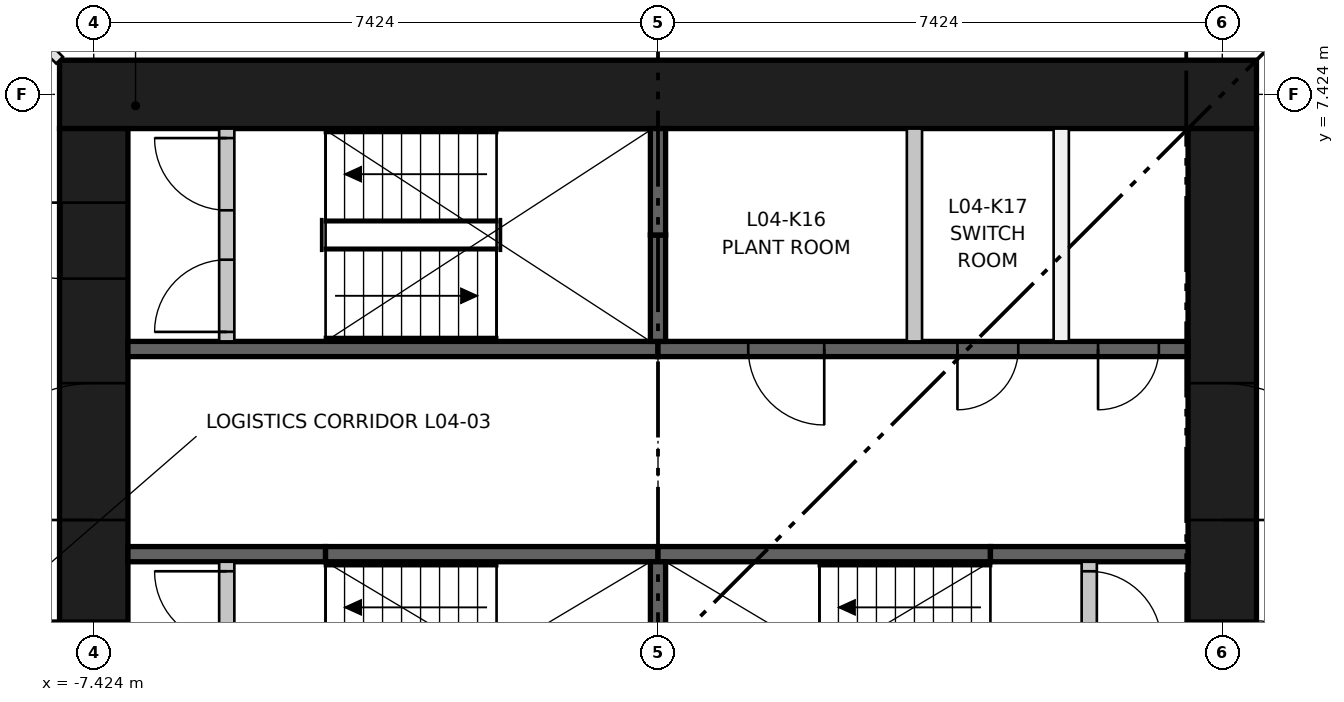
"""IFC4 building model, lengths in metres.
Left out: names, types, materials, properties, quantities, classifications, styles, units other than length and angle.
Written with IfcOpenShell. Run it as: python <this file> out.ifc"""

import sys

from ifc_helpers import new_model, si_unit, direction, frame, frame_2d, origin, place, context, subcontext, project, spatial, rectangle, extrude, element, fill, save


model = new_model("IFC4")
c1 = context("Model", 3, precision=1e-05, world=origin(), true_north=direction((0.0, 1.0)))
c2 = subcontext(c1, "Body", "Model", "MODEL_VIEW")
j1 = project(units=[si_unit("LENGTHUNIT", "METRE"), si_unit("PLANEANGLEUNIT", "RADIAN")], contexts=[c1])
p1 = place(None, origin())
s1 = spatial("IfcSite", under=j1, at=p1, CompositionType="ELEMENT")
p2 = place(p1, origin())
s2 = spatial("IfcBuilding", under=s1, at=p2, CompositionType="ELEMENT")
p3 = place(p2, frame((0.0, 0.0, 18.5)))
s3 = spatial("IfcBuildingStorey", under=s2, at=p3, CompositionType="ELEMENT", Elevation=18.5)
p4 = place(p3, frame((-7.874, 7.424, 0.0), z_axis=(0.0, 0.0, 1.0), x_axis=(1.0, 0.0, 0.0)))
e1 = element("IfcWall", 1, at=p4, inside=s3, PredefinedType="SHEAR", context=c2, shape_type="SweptSolid", body=[
    extrude(rectangle(XDim=15.748, YDim=0.9, at=frame_2d((7.874, 0.0))), origin(), (0.0, 0.0, 1.0), 3.9),
])
p5 = place(p3, frame((-7.424, -6.974, 0.0), z_axis=(0.0, 0.0, 1.0), x_axis=(0.0, 1.0, 0.0)))
e2 = element("IfcWall", 2, at=p5, inside=s3, PredefinedType="SHEAR", context=c2, shape_type="SweptSolid", body=[
    extrude(rectangle(XDim=13.948, YDim=0.9, at=frame_2d((6.974, 0.0))), origin(), (0.0, 0.0, 1.0), 3.9),
])
p6 = place(p5, frame((6.474, 0.0, 0.0)))
e3 = element("IfcOpeningElement", 3, at=p6, cuts=e2, PredefinedType="OPENING", context=c2, shape_type="SweptSolid", body=[
    extrude(rectangle(XDim=1.0, YDim=2.1, at=frame_2d((0.5, 1.05))), frame((0.0, 0.46, 0.0), z_axis=(0.0, -1.0, 0.0), x_axis=(1.0, 0.0, 0.0)), (0.0, 0.0, 1.0), 0.92),
])
p7 = place(p5, frame((3.35, 0.0, 0.0)))
e4 = element("IfcOpeningElement", 4, at=p7, cuts=e2, PredefinedType="OPENING", context=c2, shape_type="SweptSolid", body=[
    extrude(rectangle(XDim=1.8, YDim=2.1, at=frame_2d((0.9, 1.05))), frame((0.0, 0.46, 0.0), z_axis=(0.0, -1.0, 0.0), x_axis=(1.0, 0.0, 0.0)), (0.0, 0.0, 1.0), 0.92),
])
p8 = place(p5, frame((8.799, 0.0, 0.0)))
e5 = element("IfcOpeningElement", 5, at=p8, cuts=e2, PredefinedType="OPENING", context=c2, shape_type="SweptSolid", body=[
    extrude(rectangle(XDim=1.8, YDim=2.1, at=frame_2d((0.9, 1.05))), frame((0.0, 0.46, 0.0), z_axis=(0.0, -1.0, 0.0), x_axis=(1.0, 0.0, 0.0)), (0.0, 0.0, 1.0), 0.92),
])
p9 = place(p5, frame((11.974, 0.0, 0.0)))
e6 = element("IfcOpeningElement", 6, at=p9, cuts=e2, PredefinedType="OPENING", context=c2, shape_type="SweptSolid", body=[
    extrude(rectangle(XDim=1.0, YDim=2.1, at=frame_2d((0.5, 1.05))), frame((0.0, 0.46, 0.0), z_axis=(0.0, -1.0, 0.0), x_axis=(1.0, 0.0, 0.0)), (0.0, 0.0, 1.0), 0.92),
])
p10 = place(p3, frame((7.424, -6.974, 0.0), z_axis=(0.0, 0.0, 1.0), x_axis=(0.0, 1.0, 0.0)))
e7 = element("IfcWall", 7, at=p10, inside=s3, PredefinedType="SHEAR", context=c2, shape_type="SweptSolid", body=[
    extrude(rectangle(XDim=13.948, YDim=0.9, at=frame_2d((6.974, 0.0))), origin(), (0.0, 0.0, 1.0), 3.9),
])
p11 = place(p10, frame((6.474, 0.0, 0.0)))
e8 = element("IfcOpeningElement", 8, at=p11, cuts=e7, PredefinedType="OPENING", context=c2, shape_type="SweptSolid", body=[
    extrude(rectangle(XDim=1.0, YDim=2.1, at=frame_2d((0.5, 1.05))), frame((0.0, 0.46, 0.0), z_axis=(0.0, -1.0, 0.0), x_axis=(1.0, 0.0, 0.0)), (0.0, 0.0, 1.0), 0.92),
])
p12 = place(p10, frame((3.35, 0.0, 0.0)))
e9 = element("IfcOpeningElement", 9, at=p12, cuts=e7, PredefinedType="OPENING", context=c2, shape_type="SweptSolid", body=[
    extrude(rectangle(XDim=1.8, YDim=2.1, at=frame_2d((0.9, 1.05))), frame((0.0, 0.46, 0.0), z_axis=(0.0, -1.0, 0.0), x_axis=(1.0, 0.0, 0.0)), (0.0, 0.0, 1.0), 0.92),
])
p13 = place(p10, frame((8.799, 0.0, 0.0)))
e10 = element("IfcOpeningElement", 10, at=p13, cuts=e7, PredefinedType="OPENING", context=c2, shape_type="SweptSolid", body=[
    extrude(rectangle(XDim=1.8, YDim=2.1, at=frame_2d((0.9, 1.05))), frame((0.0, 0.46, 0.0), z_axis=(0.0, -1.0, 0.0), x_axis=(1.0, 0.0, 0.0)), (0.0, 0.0, 1.0), 0.92),
])
p14 = place(p3, frame((-6.974, 4.074, 0.0), z_axis=(0.0, 0.0, 1.0), x_axis=(1.0, 0.0, 0.0)))
e11 = element("IfcWall", 11, at=p14, inside=s3, PredefinedType="SHEAR", context=c2, shape_type="SweptSolid", body=[
    extrude(rectangle(XDim=6.974, YDim=0.2, at=frame_2d((3.487, 0.0))), origin(), (0.0, 0.0, 1.0), 3.55),
])
p15 = place(p3, frame((0.0, 4.074, 0.0), z_axis=(0.0, 0.0, 1.0), x_axis=(1.0, 0.0, 0.0)))
e12 = element("IfcWall", 12, at=p15, inside=s3, PredefinedType="SHEAR", context=c2, shape_type="SweptSolid", body=[
    extrude(rectangle(XDim=6.974, YDim=0.2, at=frame_2d((3.487, 0.0))), origin(), (0.0, 0.0, 1.0), 3.55),
])
p16 = place(p15, frame((1.187, 0.0, 0.0)))
e13 = element("IfcOpeningElement", 13, at=p16, cuts=e12, PredefinedType="OPENING", context=c2, shape_type="SweptSolid", body=[
    extrude(rectangle(XDim=1.0, YDim=2.1, at=frame_2d((0.5, 1.05))), frame((0.0, 0.11, 0.0), z_axis=(0.0, -1.0, 0.0), x_axis=(1.0, 0.0, 0.0)), (0.0, 0.0, 1.0), 0.22),
])
p17 = place(p15, frame((3.94, 0.0, 0.0)))
e14 = element("IfcOpeningElement", 14, at=p17, cuts=e12, PredefinedType="OPENING", context=c2, shape_type="SweptSolid", body=[
    extrude(rectangle(XDim=0.8, YDim=2.1, at=frame_2d((0.4, 1.05))), frame((0.0, 0.11, 0.0), z_axis=(0.0, -1.0, 0.0), x_axis=(1.0, 0.0, 0.0)), (0.0, 0.0, 1.0), 0.22),
])
p18 = place(p15, frame((5.79, 0.0, 0.0)))
e15 = element("IfcOpeningElement", 15, at=p18, cuts=e12, PredefinedType="OPENING", context=c2, shape_type="SweptSolid", body=[
    extrude(rectangle(XDim=0.8, YDim=2.1, at=frame_2d((0.4, 1.05))), frame((0.0, 0.11, 0.0), z_axis=(0.0, -1.0, 0.0), x_axis=(1.0, 0.0, 0.0)), (0.0, 0.0, 1.0), 0.22),
])
p19 = place(p3, frame((-6.974, 1.375, 0.0), z_axis=(0.0, 0.0, 1.0), x_axis=(1.0, 0.0, 0.0)))
e16 = element("IfcWall", 16, at=p19, inside=s3, PredefinedType="SHEAR", context=c2, shape_type="SweptSolid", body=[
    extrude(rectangle(XDim=2.6, YDim=0.2, at=frame_2d((1.3, 0.0))), origin(), (0.0, 0.0, 1.0), 3.55),
])
for number, where, z_axis, x_axis in (
    (17, (-4.374, 1.375, 0.0), (0.0, 0.0, 1.0), (1.0, 0.0, 0.0)),
    (18, (0.0, 1.375, 0.0), (0.0, 0.0, 1.0), (1.0, 0.0, 0.0)),
):
    element("IfcWall", number, at=place(p3, frame(where, z_axis=z_axis, x_axis=x_axis)), inside=s3, PredefinedType="SHEAR", context=c2, shape_type="SweptSolid", body=[
        extrude(rectangle(XDim=4.374, YDim=0.2, at=frame_2d((2.187, 0.0))), origin(), (0.0, 0.0, 1.0), 3.55),
    ])
p20 = place(p3, frame((4.374, 1.375, 0.0), z_axis=(0.0, 0.0, 1.0), x_axis=(1.0, 0.0, 0.0)))
e19 = element("IfcWall", 19, at=p20, inside=s3, PredefinedType="SHEAR", context=c2, shape_type="SweptSolid", body=[
    extrude(rectangle(XDim=2.6, YDim=0.2, at=frame_2d((1.3, 0.0))), origin(), (0.0, 0.0, 1.0), 3.55),
])
p21 = place(p3, frame((0.0, -1.275, 0.0), z_axis=(0.0, 0.0, 1.0), x_axis=(0.0, 1.0, 0.0)))
e20 = element("IfcWall", 20, at=p21, inside=s3, PredefinedType="SHEAR", context=c2, shape_type="SweptSolid", body=[
    extrude(rectangle(XDim=2.55, YDim=0.2, at=frame_2d((1.275, 0.0))), origin(), (0.0, 0.0, 1.0), 3.55),
])
p22 = place(p3, frame((0.0, 4.174, 0.0), z_axis=(0.0, 0.0, 1.0), x_axis=(0.0, 1.0, 0.0)))
e21 = element("IfcWall", 21, at=p22, inside=s3, PredefinedType="SHEAR", context=c2, shape_type="SweptSolid", body=[
    extrude(rectangle(XDim=1.4, YDim=0.2, at=frame_2d((0.7, 0.0))), origin(), (0.0, 0.0, 1.0), 3.55),
])
p23 = place(p3, frame((0.0, 5.574, 0.0), z_axis=(0.0, 0.0, 1.0), x_axis=(0.0, 1.0, 0.0)))
e22 = element("IfcWall", 22, at=p23, inside=s3, PredefinedType="SHEAR", context=c2, shape_type="SweptSolid", body=[
    extrude(rectangle(XDim=1.4, YDim=0.2, at=frame_2d((0.7, 0.0))), origin(), (0.0, 0.0, 1.0), 3.55),
])
for number, where, z_axis, x_axis in (
    (23, (3.374, 4.174, 0.0), (0.0, 0.0, 1.0), (0.0, 1.0, 0.0)),
    (24, (5.305, 4.174, 0.0), (0.0, 0.0, 1.0), (0.0, 1.0, 0.0)),
):
    element("IfcWall", number, at=place(p3, frame(where, z_axis=z_axis, x_axis=x_axis)), inside=s3, PredefinedType="PARTITIONING", context=c2, shape_type="SweptSolid", body=[
        extrude(rectangle(XDim=2.8, YDim=0.2, at=frame_2d((1.4, 0.0))), origin(), (0.0, 0.0, 1.0), 3.55),
    ])
p24 = place(p3, frame((-5.674, -1.275, 0.0), z_axis=(0.0, 0.0, 1.0), x_axis=(0.0, 1.0, 0.0)))
e25 = element("IfcWall", 25, at=p24, inside=s3, PredefinedType="PARTITIONING", context=c2, shape_type="SweptSolid", body=[
    extrude(rectangle(XDim=2.55, YDim=0.2, at=frame_2d((1.275, 0.0))), origin(), (0.0, 0.0, 1.0), 3.55),
])
p25 = place(p24, frame((0.125, 0.0, 0.0)))
e26 = element("IfcOpeningElement", 26, at=p25, cuts=e25, PredefinedType="OPENING", context=c2, shape_type="SweptSolid", body=[
    extrude(rectangle(XDim=0.95, YDim=2.1, at=frame_2d((0.475, 1.05))), frame((0.0, 0.11, 0.0), z_axis=(0.0, -1.0, 0.0), x_axis=(1.0, 0.0, 0.0)), (0.0, 0.0, 1.0), 0.22),
])
p26 = place(p24, frame((1.475, 0.0, 0.0)))
e27 = element("IfcOpeningElement", 27, at=p26, cuts=e25, PredefinedType="OPENING", context=c2, shape_type="SweptSolid", body=[
    extrude(rectangle(XDim=0.95, YDim=2.1, at=frame_2d((0.475, 1.05))), frame((0.0, 0.11, 0.0), z_axis=(0.0, -1.0, 0.0), x_axis=(1.0, 0.0, 0.0)), (0.0, 0.0, 1.0), 0.22),
])
p27 = place(p3, frame((5.674, -1.275, 0.0), z_axis=(0.0, 0.0, 1.0), x_axis=(0.0, 1.0, 0.0)))
e28 = element("IfcWall", 28, at=p27, inside=s3, PredefinedType="PARTITIONING", context=c2, shape_type="SweptSolid", body=[
    extrude(rectangle(XDim=2.55, YDim=0.2, at=frame_2d((1.275, 0.0))), origin(), (0.0, 0.0, 1.0), 3.55),
])
p28 = place(p27, frame((0.125, 0.0, 0.0)))
e29 = element("IfcOpeningElement", 29, at=p28, cuts=e28, PredefinedType="OPENING", context=c2, shape_type="SweptSolid", body=[
    extrude(rectangle(XDim=0.95, YDim=2.1, at=frame_2d((0.475, 1.05))), frame((0.0, 0.11, 0.0), z_axis=(0.0, -1.0, 0.0), x_axis=(1.0, 0.0, 0.0)), (0.0, 0.0, 1.0), 0.22),
])
p29 = place(p27, frame((1.475, 0.0, 0.0)))
e30 = element("IfcOpeningElement", 30, at=p29, cuts=e28, PredefinedType="OPENING", context=c2, shape_type="SweptSolid", body=[
    extrude(rectangle(XDim=0.95, YDim=2.1, at=frame_2d((0.475, 1.05))), frame((0.0, 0.11, 0.0), z_axis=(0.0, -1.0, 0.0), x_axis=(1.0, 0.0, 0.0)), (0.0, 0.0, 1.0), 0.22),
])
p30 = place(p3, frame((-5.674, 4.174, 0.0), z_axis=(0.0, 0.0, 1.0), x_axis=(0.0, 1.0, 0.0)))
e31 = element("IfcWall", 31, at=p30, inside=s3, PredefinedType="PARTITIONING", context=c2, shape_type="SweptSolid", body=[
    extrude(rectangle(XDim=2.8, YDim=0.2, at=frame_2d((1.4, 0.0))), origin(), (0.0, 0.0, 1.0), 3.55),
])
p31 = place(p30, frame((0.125, 0.0, 0.0)))
e32 = element("IfcOpeningElement", 32, at=p31, cuts=e31, PredefinedType="OPENING", context=c2, shape_type="SweptSolid", body=[
    extrude(rectangle(XDim=0.95, YDim=2.1, at=frame_2d((0.475, 1.05))), frame((0.0, 0.11, 0.0), z_axis=(0.0, -1.0, 0.0), x_axis=(1.0, 0.0, 0.0)), (0.0, 0.0, 1.0), 0.22),
])
p32 = place(p30, frame((1.725, 0.0, 0.0)))
e33 = element("IfcOpeningElement", 33, at=p32, cuts=e31, PredefinedType="OPENING", context=c2, shape_type="SweptSolid", body=[
    extrude(rectangle(XDim=0.95, YDim=2.1, at=frame_2d((0.475, 1.05))), frame((0.0, 0.11, 0.0), z_axis=(0.0, -1.0, 0.0), x_axis=(1.0, 0.0, 0.0)), (0.0, 0.0, 1.0), 0.22),
])
p33 = place(p3, frame((-7.874, 7.874, 0.0), z_axis=(0.0, 0.0, 1.0), x_axis=(-0.707106781187, 0.707106781187, 0.0)))
e34 = element("IfcWall", 34, at=p33, inside=s3, PredefinedType="PARTITIONING", context=c2, shape_type="SweptSolid", body=[
    extrude(rectangle(XDim=2.102, YDim=0.125, at=frame_2d((1.051, 0.0))), origin(), (0.0, 0.0, 1.0), 3.55),
])
p34 = place(p33, frame((0.6, 0.0, 0.0)))
e35 = element("IfcOpeningElement", 35, at=p34, cuts=e34, PredefinedType="OPENING", context=c2, shape_type="SweptSolid", body=[
    extrude(rectangle(XDim=1.0, YDim=2.1, at=frame_2d((0.5, 1.05))), frame((0.0, 0.073, 0.0), z_axis=(0.0, -1.0, 0.0), x_axis=(1.0, 0.0, 0.0)), (0.0, 0.0, 1.0), 0.145),
])
p35 = place(p26, origin())
e36 = element("IfcDoor", 36, at=p35, inside=s3, OperationType="SINGLE_SWING_RIGHT", PredefinedType="DOOR", context=c2, shape_type="SweptSolid", body=[
    extrude(rectangle(XDim=0.95, YDim=2.1, at=frame_2d((0.475, 1.05))), frame((0.0, 0.025, 0.0), z_axis=(0.0, -1.0, 0.0), x_axis=(1.0, 0.0, 0.0)), (0.0, 0.0, 1.0), 0.05),
])
fill(e27, e36)
p36 = place(p29, frame((0.95, 0.0, 0.0), z_axis=(0.0, 0.0, 1.0), x_axis=(-1.0, 0.0, 0.0)))
e37 = element("IfcDoor", 37, at=p36, inside=s3, OperationType="SINGLE_SWING_LEFT", PredefinedType="DOOR", context=c2, shape_type="SweptSolid", body=[
    extrude(rectangle(XDim=0.95, YDim=2.1, at=frame_2d((0.475, 1.05))), frame((0.0, 0.025, 0.0), z_axis=(0.0, -1.0, 0.0), x_axis=(1.0, 0.0, 0.0)), (0.0, 0.0, 1.0), 0.05),
])
fill(e30, e37)
p37 = place(p31, origin())
e38 = element("IfcDoor", 38, at=p37, inside=s3, OperationType="SINGLE_SWING_LEFT", PredefinedType="DOOR", context=c2, shape_type="SweptSolid", body=[
    extrude(rectangle(XDim=0.95, YDim=2.1, at=frame_2d((0.475, 1.05))), frame((0.0, 0.025, 0.0), z_axis=(0.0, -1.0, 0.0), x_axis=(1.0, 0.0, 0.0)), (0.0, 0.0, 1.0), 0.05),
])
fill(e32, e38)
p38 = place(p32, origin())
e39 = element("IfcDoor", 39, at=p38, inside=s3, OperationType="SINGLE_SWING_RIGHT", PredefinedType="DOOR", context=c2, shape_type="SweptSolid", body=[
    extrude(rectangle(XDim=0.95, YDim=2.1, at=frame_2d((0.475, 1.05))), frame((0.0, 0.025, 0.0), z_axis=(0.0, -1.0, 0.0), x_axis=(1.0, 0.0, 0.0)), (0.0, 0.0, 1.0), 0.05),
])
fill(e33, e39)
p39 = place(p16, frame((1.0, 0.0, 0.0), z_axis=(0.0, 0.0, 1.0), x_axis=(-1.0, 0.0, 0.0)))
e40 = element("IfcDoor", 40, at=p39, inside=s3, OperationType="SINGLE_SWING_RIGHT", PredefinedType="DOOR", context=c2, shape_type="SweptSolid", body=[
    extrude(rectangle(XDim=1.0, YDim=2.1, at=frame_2d((0.5, 1.05))), frame((0.0, 0.025, 0.0), z_axis=(0.0, -1.0, 0.0), x_axis=(1.0, 0.0, 0.0)), (0.0, 0.0, 1.0), 0.05),
])
fill(e13, e40)
p40 = place(p17, frame((0.8, 0.0, 0.0), z_axis=(0.0, 0.0, 1.0), x_axis=(-1.0, 0.0, 0.0)))
e41 = element("IfcDoor", 41, at=p40, inside=s3, OperationType="SINGLE_SWING_LEFT", PredefinedType="DOOR", context=c2, shape_type="SweptSolid", body=[
    extrude(rectangle(XDim=0.8, YDim=2.1, at=frame_2d((0.4, 1.05))), frame((0.0, 0.025, 0.0), z_axis=(0.0, -1.0, 0.0), x_axis=(1.0, 0.0, 0.0)), (0.0, 0.0, 1.0), 0.05),
])
fill(e14, e41)
p41 = place(p18, frame((0.8, 0.0, 0.0), z_axis=(0.0, 0.0, 1.0), x_axis=(-1.0, 0.0, 0.0)))
e42 = element("IfcDoor", 42, at=p41, inside=s3, OperationType="SINGLE_SWING_LEFT", PredefinedType="DOOR", context=c2, shape_type="SweptSolid", body=[
    extrude(rectangle(XDim=0.8, YDim=2.1, at=frame_2d((0.4, 1.05))), frame((0.0, 0.025, 0.0), z_axis=(0.0, -1.0, 0.0), x_axis=(1.0, 0.0, 0.0)), (0.0, 0.0, 1.0), 0.05),
])
fill(e15, e42)
p42 = place(p6, origin())
e43 = element("IfcDoor", 43, at=p42, inside=s3, OperationType="SINGLE_SWING_RIGHT", PredefinedType="DOOR", context=c2, shape_type="SweptSolid", body=[
    extrude(rectangle(XDim=1.0, YDim=2.1, at=frame_2d((0.5, 1.05))), frame((0.0, 0.45, 0.0), z_axis=(0.0, -1.0, 0.0), x_axis=(1.0, 0.0, 0.0)), (0.0, 0.0, 1.0), 0.05),
])
fill(e3, e43)
p43 = place(p8, origin())
e44 = element("IfcDoor", 44, at=p43, inside=s3, OperationType="DOUBLE_DOOR_SINGLE_SWING", PredefinedType="DOOR", context=c2, shape_type="SweptSolid", body=[
    extrude(rectangle(XDim=1.8, YDim=2.1, at=frame_2d((0.9, 1.05))), frame((0.0, 0.025, 0.0), z_axis=(0.0, -1.0, 0.0), x_axis=(1.0, 0.0, 0.0)), (0.0, 0.0, 1.0), 0.05),
])
fill(e5, e44)
p44 = place(p9, origin())
e45 = element("IfcDoor", 45, at=p44, inside=s3, OperationType="SINGLE_SWING_RIGHT", PredefinedType="DOOR", context=c2, shape_type="SweptSolid", body=[
    extrude(rectangle(XDim=1.0, YDim=2.1, at=frame_2d((0.5, 1.05))), frame((0.0, 0.45, 0.0), z_axis=(0.0, -1.0, 0.0), x_axis=(1.0, 0.0, 0.0)), (0.0, 0.0, 1.0), 0.05),
])
fill(e6, e45)
p45 = place(p11, frame((1.0, 0.0, 0.0), z_axis=(0.0, 0.0, 1.0), x_axis=(-1.0, 0.0, 0.0)))
e46 = element("IfcDoor", 46, at=p45, inside=s3, OperationType="SINGLE_SWING_LEFT", PredefinedType="DOOR", context=c2, shape_type="SweptSolid", body=[
    extrude(rectangle(XDim=1.0, YDim=2.1, at=frame_2d((0.5, 1.05))), frame((0.0, 0.45, 0.0), z_axis=(0.0, -1.0, 0.0), x_axis=(1.0, 0.0, 0.0)), (0.0, 0.0, 1.0), 0.05),
])
fill(e8, e46)
p46 = place(p13, frame((1.8, 0.0, 0.0), z_axis=(0.0, 0.0, 1.0), x_axis=(-1.0, 0.0, 0.0)))
e47 = element("IfcDoor", 47, at=p46, inside=s3, OperationType="DOUBLE_DOOR_SINGLE_SWING", PredefinedType="DOOR", context=c2, shape_type="SweptSolid", body=[
    extrude(rectangle(XDim=1.8, YDim=2.1, at=frame_2d((0.9, 1.05))), frame((0.0, 0.025, 0.0), z_axis=(0.0, -1.0, 0.0), x_axis=(1.0, 0.0, 0.0)), (0.0, 0.0, 1.0), 0.05),
])
fill(e10, e47)
save(model, sys.argv[1])
